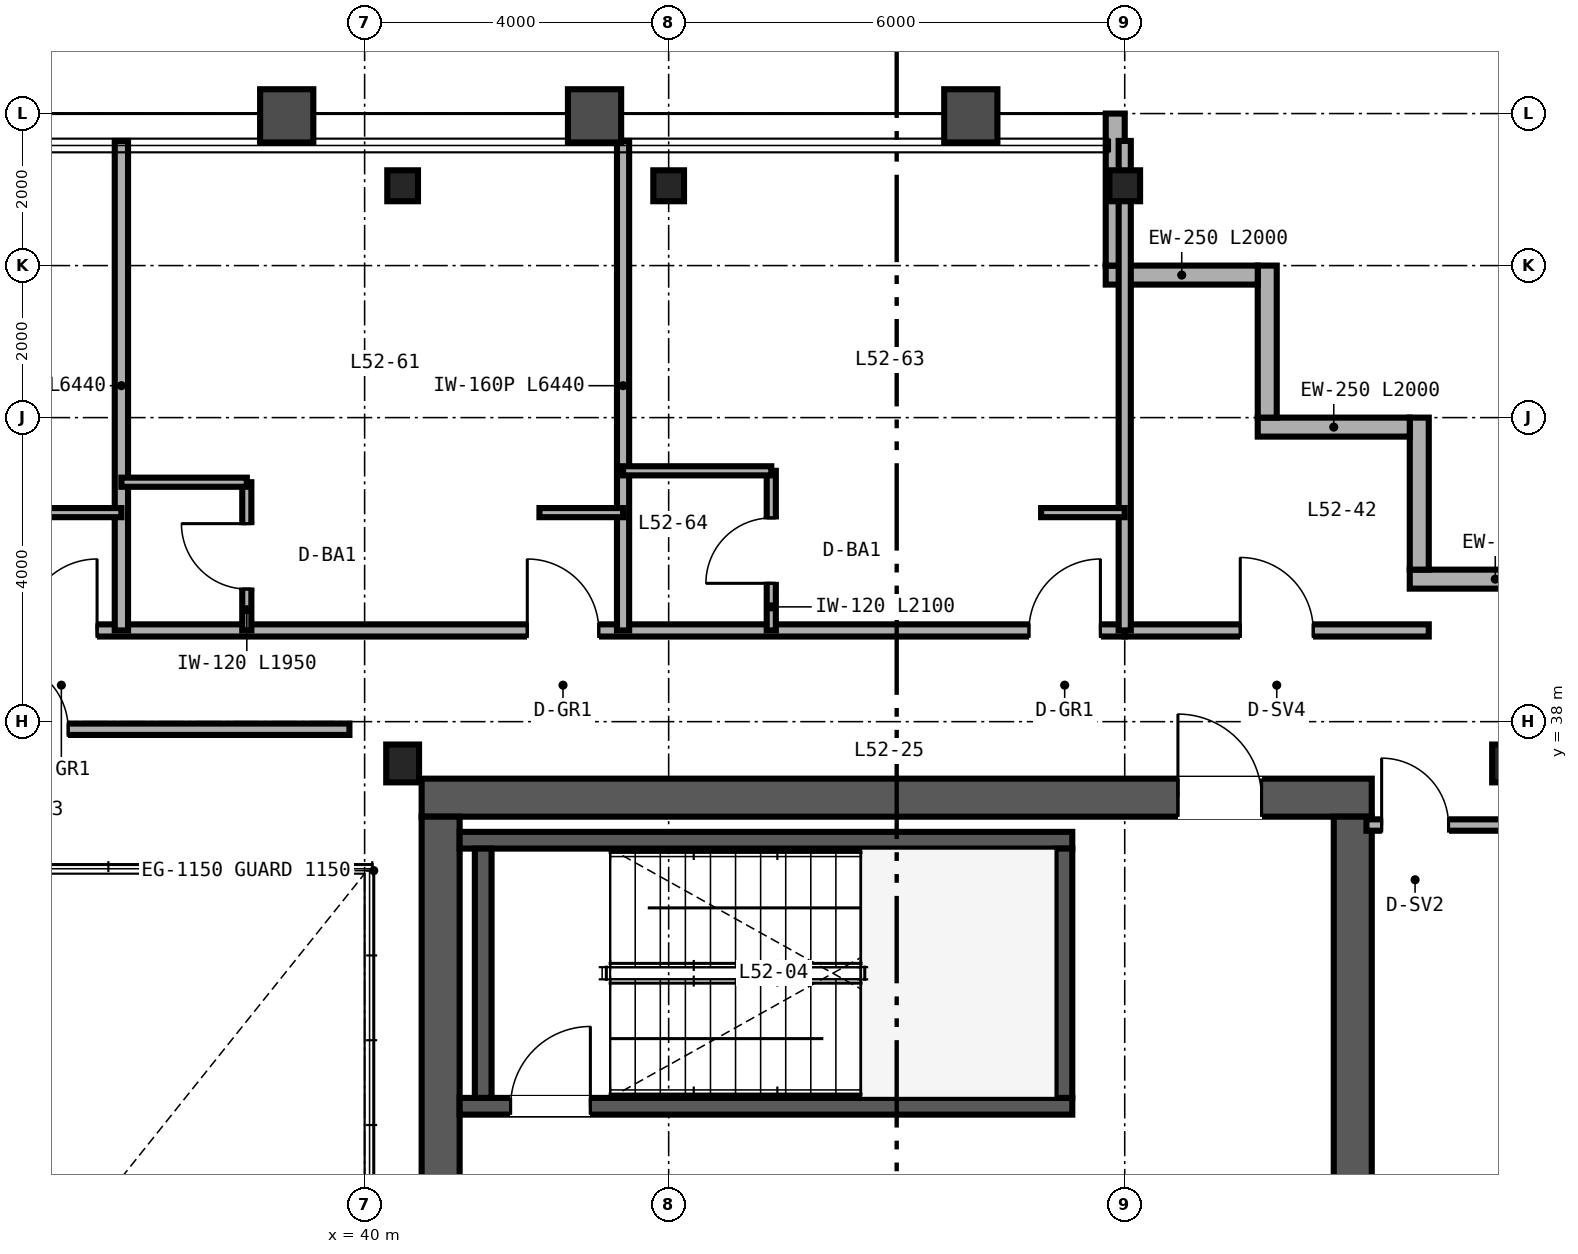
"""IFC4 building model, lengths in metres.
Left out: names, types, materials, properties, quantities, classifications, styles, units other than length and angle.
Written with IfcOpenShell. Run it as: python <this file> out.ifc"""

import sys

from ifc_helpers import new_model, si_unit, direction, frame, frame_2d, origin, origin_2d, place, context, subcontext, project, spatial, rectangle, i_section, extrude, source, transform, mapped, element, fill, save


model = new_model("IFC4")
c1 = context("Model", 3, precision=1e-05, world=origin(), true_north=direction((0.0, 1.0)))
c2 = subcontext(c1, "Body", "Model", "MODEL_VIEW")
j1 = project(units=[si_unit("LENGTHUNIT", "METRE"), si_unit("PLANEANGLEUNIT", "RADIAN")], contexts=[c1])
p1 = place(None, origin())
s1 = spatial("IfcSite", under=j1, at=p1, CompositionType="ELEMENT")
p2 = place(p1, origin())
s2 = spatial("IfcBuilding", under=s1, at=p2, CompositionType="ELEMENT")
p3 = place(p2, frame((0.0, 0.0, 206.4)))
s3 = spatial("IfcBuildingStorey", under=s2, at=p3, CompositionType="ELEMENT", Elevation=206.4)
p4 = place(p3, frame((40.75, 37.0, 0.0), z_axis=(0.0, 0.0, 1.0), x_axis=(1.0, 0.0, 0.0)))
e1 = element("IfcWall", 1, at=p4, inside=s3, PredefinedType="SHEAR", context=c2, shape_type="SweptSolid", body=[
    extrude(rectangle(XDim=12.5, YDim=0.5, at=frame_2d((6.25, 0.0))), origin(), (0.0, 0.0, 1.0), 3.37),
])
p5 = place(p4, frame((9.95, 0.0, 0.0)))
e2 = element("IfcOpeningElement", 2, at=p5, cuts=e1, PredefinedType="OPENING", context=c2, shape_type="SweptSolid", body=[
    extrude(rectangle(XDim=1.1, YDim=2.15, at=frame_2d((0.55, 1.075))), frame((0.0, 0.26, 0.0), z_axis=(0.0, -1.0, 0.0), x_axis=(1.0, 0.0, 0.0)), (0.0, 0.0, 1.0), 0.52),
])
for number, where, z_axis, x_axis in (
    (3, (41.0, 15.25, 0.0), (0.0, 0.0, 1.0), (0.0, 1.0, 0.0)),
    (4, (53.0, 15.25, 0.0), (0.0, 0.0, 1.0), (0.0, 1.0, 0.0)),
):
    element("IfcWall", number, at=place(p3, frame(where, z_axis=z_axis, x_axis=x_axis)), inside=s3, PredefinedType="SHEAR", context=c2, shape_type="SweptSolid", body=[
        extrude(rectangle(XDim=21.5, YDim=0.5, at=frame_2d((10.75, 0.0))), origin(), (0.0, 0.0, 1.0), 3.37),
    ])
p6 = place(p3, frame((41.25, 32.94, 0.0), z_axis=(0.0, 0.0, 1.0), x_axis=(1.0, 0.0, 0.0)))
e5 = element("IfcWall", 5, at=p6, inside=s3, PredefinedType="SHEAR", context=c2, shape_type="SweptSolid", body=[
    extrude(rectangle(XDim=8.06, YDim=0.22, at=frame_2d((4.03, 0.0))), origin(), (0.0, 0.0, 1.0), 3.4),
])
p7 = place(p6, frame((0.67, 0.0, 0.0)))
e6 = element("IfcOpeningElement", 6, at=p7, cuts=e5, PredefinedType="OPENING", context=c2, shape_type="SweptSolid", body=[
    extrude(rectangle(XDim=1.05, YDim=2.15, at=frame_2d((0.525, 1.075))), frame((0.0, 0.12, 0.0), z_axis=(0.0, -1.0, 0.0), x_axis=(1.0, 0.0, 0.0)), (0.0, 0.0, 1.0), 0.24),
])
p8 = place(p3, frame((41.25, 36.44, 0.0), z_axis=(0.0, 0.0, 1.0), x_axis=(1.0, 0.0, 0.0)))
e7 = element("IfcWall", 7, at=p8, inside=s3, PredefinedType="SHEAR", context=c2, shape_type="SweptSolid", body=[
    extrude(rectangle(XDim=8.06, YDim=0.22, at=frame_2d((4.03, 0.0))), origin(), (0.0, 0.0, 1.0), 3.4),
])
for number, where, z_axis, x_axis in (
    (8, (41.56, 33.05, 0.0), (0.0, 0.0, 1.0), (0.0, 1.0, 0.0)),
    (9, (49.2, 33.05, 0.0), (0.0, 0.0, 1.0), (0.0, 1.0, 0.0)),
):
    element("IfcWall", number, at=place(p3, frame(where, z_axis=z_axis, x_axis=x_axis)), inside=s3, PredefinedType="SHEAR", context=c2, shape_type="SweptSolid", body=[
        extrude(rectangle(XDim=3.28, YDim=0.22, at=frame_2d((1.64, 0.0))), origin(), (0.0, 0.0, 1.0), 3.4),
    ])
m1 = source(origin(), c2, "Body", "SweptSolid", [
    extrude(i_section(OverallWidth=0.432, OverallDepth=0.498, WebThickness=0.056, FlangeThickness=0.089, FilletRadius=0.025, at=origin_2d()), origin(), (0.0, 0.0, 1.0), 3.37),
])
for number, where, z_axis, x_axis in (
    (10, (40.5, 37.45, 0.0), (0.0, 0.0, 1.0), (1.0, 0.0, 0.0)),
    (11, (55.05, 37.45, 0.0), (0.0, 0.0, 1.0), (1.0, 0.0, 0.0)),
):
    element("IfcColumn", number, at=place(p3, frame(where, z_axis=z_axis, x_axis=x_axis)), inside=s3, PredefinedType="COLUMN", context=c2, shape_type="MappedRepresentation", body=[
        mapped(m1, transform((0.0, 0.0, 0.0), scale=1.0)),
    ])
m2 = source(origin(), c2, "Body", "SweptSolid", [
    extrude(i_section(OverallWidth=0.404, OverallDepth=0.407, WebThickness=0.027, FlangeThickness=0.044, FilletRadius=0.025, at=origin_2d()), origin(), (0.0, 0.0, 1.0), 3.37),
])
for number, where, z_axis, x_axis in (
    (12, (40.5, 45.05, 0.0), (0.0, 0.0, 1.0), (1.0, 0.0, 0.0)),
    (13, (44.0, 45.05, 0.0), (0.0, 0.0, 1.0), (1.0, 0.0, 0.0)),
    (14, (50.0, 45.05, 0.0), (0.0, 0.0, 1.0), (1.0, 0.0, 0.0)),
):
    element("IfcColumn", number, at=place(p3, frame(where, z_axis=z_axis, x_axis=x_axis)), inside=s3, PredefinedType="COLUMN", context=c2, shape_type="MappedRepresentation", body=[
        mapped(m2, transform((0.0, 0.0, 0.0), scale=1.0)),
    ])
p9 = place(p3, frame((56.0, 39.875, 0.0), z_axis=(0.0, 0.0, 1.0), x_axis=(-1.0, 0.0, 0.0)))
e15 = element("IfcWall", 15, at=p9, inside=s3, PredefinedType="SOLIDWALL", context=c2, shape_type="SweptSolid", body=[
    extrude(rectangle(XDim=2.25, YDim=0.25, at=frame_2d((1.125, 0.0))), origin(), (0.0, 0.0, 1.0), 3.37),
])
for number, where, z_axis, x_axis in (
    (16, (53.875, 40.0, 0.0), (0.0, 0.0, 1.0), (0.0, 1.0, 0.0)),
    (17, (53.75, 41.875, 0.0), (0.0, 0.0, 1.0), (-1.0, 0.0, 0.0)),
    (18, (51.875, 42.0, 0.0), (0.0, 0.0, 1.0), (0.0, 1.0, 0.0)),
    (19, (51.75, 43.875, 0.0), (0.0, 0.0, 1.0), (-1.0, 0.0, 0.0)),
):
    element("IfcWall", number, at=place(p3, frame(where, z_axis=z_axis, x_axis=x_axis)), inside=s3, PredefinedType="SOLIDWALL", context=c2, shape_type="SweptSolid", body=[
        extrude(rectangle(XDim=2.0, YDim=0.25, at=frame_2d((1.0, 0.0))), origin(), (0.0, 0.0, 1.0), 3.37),
    ])
p10 = place(p3, frame((49.875, 44.0, 0.0), z_axis=(0.0, 0.0, 1.0), x_axis=(0.0, 1.0, 0.0)))
e20 = element("IfcWall", 20, at=p10, inside=s3, PredefinedType="SOLIDWALL", context=c2, shape_type="SweptSolid", body=[
    extrude(rectangle(XDim=2.0, YDim=0.25, at=frame_2d((1.0, 0.0))), origin(), (0.0, 0.0, 1.0), 2.677),
])
p11 = place(p3, frame((24.2, 37.9, 0.0), z_axis=(0.0, 0.0, 1.0), x_axis=(1.0, 0.0, 0.0)))
e21 = element("IfcWall", 21, at=p11, inside=s3, PredefinedType="PARTITIONING", context=c2, shape_type="SweptSolid", body=[
    extrude(rectangle(XDim=15.6, YDim=0.15, at=frame_2d((7.8, 0.0))), origin(), (0.0, 0.0, 1.0), 3.37),
])
p12 = place(p11, frame((3.0, 0.0, 0.0)))
e22 = element("IfcOpeningElement", 22, at=p12, cuts=e21, PredefinedType="OPENING", context=c2, shape_type="SweptSolid", body=[
    extrude(rectangle(XDim=0.9, YDim=2.15, at=frame_2d((0.45, 1.075))), frame((0.0, 0.085, 0.0), z_axis=(0.0, -1.0, 0.0), x_axis=(1.0, 0.0, 0.0)), (0.0, 0.0, 1.0), 0.17),
])
p13 = place(p11, frame((11.0, 0.0, 0.0)))
e23 = element("IfcOpeningElement", 23, at=p13, cuts=e21, PredefinedType="OPENING", context=c2, shape_type="SweptSolid", body=[
    extrude(rectangle(XDim=0.9, YDim=2.15, at=frame_2d((0.45, 1.075))), frame((0.0, 0.085, 0.0), z_axis=(0.0, -1.0, 0.0), x_axis=(1.0, 0.0, 0.0)), (0.0, 0.0, 1.0), 0.17),
])
p14 = place(p3, frame((53.18, 36.64, 0.0), z_axis=(0.0, 0.0, 1.0), x_axis=(1.0, 0.0, 0.0)))
e24 = element("IfcWall", 24, at=p14, inside=s3, PredefinedType="PARTITIONING", context=c2, shape_type="SweptSolid", body=[
    extrude(rectangle(XDim=2.66, YDim=0.15, at=frame_2d((1.33, 0.0))), origin(), (0.0, 0.0, 1.0), 2.753),
])
p15 = place(p14, frame((0.2, 0.0, 0.0)))
e25 = element("IfcOpeningElement", 25, at=p15, cuts=e24, PredefinedType="OPENING", context=c2, shape_type="SweptSolid", body=[
    extrude(rectangle(XDim=0.88, YDim=2.15, at=frame_2d((0.44, 1.075))), frame((0.0, 0.085, 0.0), z_axis=(0.0, -1.0, 0.0), x_axis=(1.0, 0.0, 0.0)), (0.0, 0.0, 1.0), 0.17),
])
p16 = place(p3, frame((50.0, 39.2, 0.0), z_axis=(0.0, 0.0, 1.0), x_axis=(1.0, 0.0, 0.0)))
e26 = element("IfcWall", 26, at=p16, inside=s3, PredefinedType="PARTITIONING", context=c2, shape_type="SweptSolid", body=[
    extrude(rectangle(XDim=4.0, YDim=0.16, at=frame_2d((2.0, 0.0))), origin(), (0.0, 0.0, 1.0), 3.37),
])
p17 = place(p16, frame((1.52, 0.0, 0.0)))
e27 = element("IfcOpeningElement", 27, at=p17, cuts=e26, PredefinedType="OPENING", context=c2, shape_type="SweptSolid", body=[
    extrude(rectangle(XDim=0.96, YDim=2.15, at=frame_2d((0.48, 1.075))), frame((0.0, 0.09, 0.0), z_axis=(0.0, -1.0, 0.0), x_axis=(1.0, 0.0, 0.0)), (0.0, 0.0, 1.0), 0.18),
])
p18 = place(p3, frame((14.0, 39.2, 0.0), z_axis=(0.0, 0.0, 1.0), x_axis=(1.0, 0.0, 0.0)))
e28 = element("IfcWall", 28, at=p18, inside=s3, PredefinedType="PARTITIONING", context=c2, shape_type="SweptSolid", body=[
    extrude(rectangle(XDim=36.0, YDim=0.16, at=frame_2d((18.0, 0.0))), origin(), (0.0, 0.0, 1.0), 2.913),
])
p19 = place(p18, frame((4.14, 0.0, 0.0)))
e29 = element("IfcOpeningElement", 29, at=p19, cuts=e28, PredefinedType="OPENING", context=c2, shape_type="SweptSolid", body=[
    extrude(rectangle(XDim=0.94, YDim=2.15, at=frame_2d((0.47, 1.075))), frame((0.0, 0.09, 0.0), z_axis=(0.0, -1.0, 0.0), x_axis=(1.0, 0.0, 0.0)), (0.0, 0.0, 1.0), 0.18),
])
p20 = place(p18, frame((9.54, 0.0, 0.0)))
e30 = element("IfcOpeningElement", 30, at=p20, cuts=e28, PredefinedType="OPENING", context=c2, shape_type="SweptSolid", body=[
    extrude(rectangle(XDim=0.94, YDim=2.15, at=frame_2d((0.47, 1.075))), frame((0.0, 0.09, 0.0), z_axis=(0.0, -1.0, 0.0), x_axis=(1.0, 0.0, 0.0)), (0.0, 0.0, 1.0), 0.18),
])
p21 = place(p18, frame((13.32, 0.0, 0.0)))
e31 = element("IfcOpeningElement", 31, at=p21, cuts=e28, PredefinedType="OPENING", context=c2, shape_type="SweptSolid", body=[
    extrude(rectangle(XDim=0.96, YDim=2.15, at=frame_2d((0.48, 1.075))), frame((0.0, 0.09, 0.0), z_axis=(0.0, -1.0, 0.0), x_axis=(1.0, 0.0, 0.0)), (0.0, 0.0, 1.0), 0.18),
])
p22 = place(p18, frame((21.54, 0.0, 0.0)))
e32 = element("IfcOpeningElement", 32, at=p22, cuts=e28, PredefinedType="OPENING", context=c2, shape_type="SweptSolid", body=[
    extrude(rectangle(XDim=0.94, YDim=2.15, at=frame_2d((0.47, 1.075))), frame((0.0, 0.09, 0.0), z_axis=(0.0, -1.0, 0.0), x_axis=(1.0, 0.0, 0.0)), (0.0, 0.0, 1.0), 0.18),
])
p23 = place(p18, frame((28.14, 0.0, 0.0)))
e33 = element("IfcOpeningElement", 33, at=p23, cuts=e28, PredefinedType="OPENING", context=c2, shape_type="SweptSolid", body=[
    extrude(rectangle(XDim=0.94, YDim=2.15, at=frame_2d((0.47, 1.075))), frame((0.0, 0.09, 0.0), z_axis=(0.0, -1.0, 0.0), x_axis=(1.0, 0.0, 0.0)), (0.0, 0.0, 1.0), 0.18),
])
p24 = place(p18, frame((34.74, 0.0, 0.0)))
e34 = element("IfcOpeningElement", 34, at=p24, cuts=e28, PredefinedType="OPENING", context=c2, shape_type="SweptSolid", body=[
    extrude(rectangle(XDim=0.94, YDim=2.15, at=frame_2d((0.47, 1.075))), frame((0.0, 0.09, 0.0), z_axis=(0.0, -1.0, 0.0), x_axis=(1.0, 0.0, 0.0)), (0.0, 0.0, 1.0), 0.18),
])
p25 = place(p3, frame((50.0, 39.2, 0.0), z_axis=(0.0, 0.0, 1.0), x_axis=(0.0, 1.0, 0.0)))
e35 = element("IfcWall", 35, at=p25, inside=s3, PredefinedType="PARTITIONING", context=c2, shape_type="SweptSolid", body=[
    extrude(rectangle(XDim=6.44, YDim=0.16, at=frame_2d((3.22, 0.0))), origin(), (0.0, 0.0, 1.0), 2.677),
])
p26 = place(p3, frame((36.8, 39.2, 0.0), z_axis=(0.0, 0.0, 1.0), x_axis=(0.0, 1.0, 0.0)))
e36 = element("IfcWall", 36, at=p26, inside=s3, PredefinedType="PARTITIONING", context=c2, shape_type="SweptSolid", body=[
    extrude(rectangle(XDim=6.44, YDim=0.175, at=frame_2d((3.22, 0.0))), origin(), (0.0, 0.0, 1.0), 2.443),
])
p27 = place(p3, frame((35.7, 40.75, 0.0), z_axis=(0.0, 0.0, 1.0), x_axis=(1.0, 0.0, 0.0)))
e37 = element("IfcWall", 37, at=p27, inside=s3, PredefinedType="PARTITIONING", context=c2, shape_type="SweptSolid", body=[
    extrude(rectangle(XDim=1.1, YDim=0.12, at=frame_2d((0.55, 0.0))), origin(), (0.0, 0.0, 1.0), 3.37),
])
p28 = place(p3, frame((43.4, 39.2, 0.0), z_axis=(0.0, 0.0, 1.0), x_axis=(0.0, 1.0, 0.0)))
e38 = element("IfcWall", 38, at=p28, inside=s3, PredefinedType="PARTITIONING", context=c2, shape_type="SweptSolid", body=[
    extrude(rectangle(XDim=6.44, YDim=0.16, at=frame_2d((3.22, 0.0))), origin(), (0.0, 0.0, 1.0), 2.833),
])
p29 = place(p3, frame((38.45, 39.2, 0.0), z_axis=(0.0, 0.0, 1.0), x_axis=(0.0, 1.0, 0.0)))
e39 = element("IfcWall", 39, at=p29, inside=s3, PredefinedType="PARTITIONING", context=c2, shape_type="SweptSolid", body=[
    extrude(rectangle(XDim=1.95, YDim=0.12, at=frame_2d((0.975, 0.0))), origin(), (0.0, 0.0, 1.0), 3.37),
])
p30 = place(p29, frame((0.545, 0.0, 0.0)))
e40 = element("IfcOpeningElement", 40, at=p30, cuts=e39, PredefinedType="OPENING", context=c2, shape_type="SweptSolid", body=[
    extrude(rectangle(XDim=0.86, YDim=2.1, at=frame_2d((0.43, 1.05))), frame((0.0, 0.07, 0.0), z_axis=(0.0, -1.0, 0.0), x_axis=(1.0, 0.0, 0.0)), (0.0, 0.0, 1.0), 0.14),
])
p31 = place(p3, frame((36.8, 41.15, 0.0), z_axis=(0.0, 0.0, 1.0), x_axis=(1.0, 0.0, 0.0)))
e41 = element("IfcWall", 41, at=p31, inside=s3, PredefinedType="PARTITIONING", context=c2, shape_type="SweptSolid", body=[
    extrude(rectangle(XDim=1.65, YDim=0.12, at=frame_2d((0.825, 0.0))), origin(), (0.0, 0.0, 1.0), 3.37),
])
p32 = place(p3, frame((42.3, 40.75, 0.0), z_axis=(0.0, 0.0, 1.0), x_axis=(1.0, 0.0, 0.0)))
e42 = element("IfcWall", 42, at=p32, inside=s3, PredefinedType="PARTITIONING", context=c2, shape_type="SweptSolid", body=[
    extrude(rectangle(XDim=1.1, YDim=0.12, at=frame_2d((0.55, 0.0))), origin(), (0.0, 0.0, 1.0), 3.37),
])
p33 = place(p3, frame((45.35, 39.2, 0.0), z_axis=(0.0, 0.0, 1.0), x_axis=(0.0, 1.0, 0.0)))
e43 = element("IfcWall", 43, at=p33, inside=s3, PredefinedType="PARTITIONING", context=c2, shape_type="SweptSolid", body=[
    extrude(rectangle(XDim=2.1, YDim=0.12, at=frame_2d((1.05, 0.0))), origin(), (0.0, 0.0, 1.0), 3.37),
])
p34 = place(p33, frame((0.62, 0.0, 0.0)))
e44 = element("IfcOpeningElement", 44, at=p34, cuts=e43, PredefinedType="OPENING", context=c2, shape_type="SweptSolid", body=[
    extrude(rectangle(XDim=0.86, YDim=2.1, at=frame_2d((0.43, 1.05))), frame((0.0, 0.07, 0.0), z_axis=(0.0, -1.0, 0.0), x_axis=(1.0, 0.0, 0.0)), (0.0, 0.0, 1.0), 0.14),
])
p35 = place(p3, frame((43.4, 41.3, 0.0), z_axis=(0.0, 0.0, 1.0), x_axis=(1.0, 0.0, 0.0)))
e45 = element("IfcWall", 45, at=p35, inside=s3, PredefinedType="PARTITIONING", context=c2, shape_type="SweptSolid", body=[
    extrude(rectangle(XDim=1.95, YDim=0.12, at=frame_2d((0.975, 0.0))), origin(), (0.0, 0.0, 1.0), 3.37),
])
p36 = place(p3, frame((48.9, 40.75, 0.0), z_axis=(0.0, 0.0, 1.0), x_axis=(1.0, 0.0, 0.0)))
e46 = element("IfcWall", 46, at=p36, inside=s3, PredefinedType="PARTITIONING", context=c2, shape_type="SweptSolid", body=[
    extrude(rectangle(XDim=1.1, YDim=0.12, at=frame_2d((0.55, 0.0))), origin(), (0.0, 0.0, 1.0), 3.37),
])
m3 = source(origin(), c2, "Body", "SweptSolid", [
    extrude(rectangle(XDim=1.05, YDim=2.15, at=frame_2d((0.525, 1.075))), frame((0.0, 0.025, 0.0), z_axis=(0.0, -1.0, 0.0), x_axis=(1.0, 0.0, 0.0)), (0.0, 0.0, 1.0), 0.05),
])
p37 = place(p7, origin())
e47 = element("IfcDoor", 47, at=p37, inside=s3, OperationType="SINGLE_SWING_RIGHT", PredefinedType="DOOR", context=c2, shape_type="MappedRepresentation", body=[
    mapped(m3, transform((0.0, 0.0, 0.0), scale=1.0)),
])
fill(e6, e47)
m4 = source(origin(), c2, "Body", "SweptSolid", [
    extrude(rectangle(XDim=1.1, YDim=2.15, at=frame_2d((0.55, 1.075))), frame((0.0, 0.025, 0.0), z_axis=(0.0, -1.0, 0.0), x_axis=(1.0, 0.0, 0.0)), (0.0, 0.0, 1.0), 0.05),
])
p38 = place(p5, origin())
e48 = element("IfcDoor", 48, at=p38, inside=s3, OperationType="SINGLE_SWING_LEFT", PredefinedType="DOOR", context=c2, shape_type="MappedRepresentation", body=[
    mapped(m4, transform((0.0, 0.0, 0.0), scale=1.0)),
])
fill(e2, e48)
m5 = source(origin(), c2, "Body", "SweptSolid", [
    extrude(rectangle(XDim=0.9, YDim=2.15, at=frame_2d((0.45, 1.075))), frame((0.0, 0.025, 0.0), z_axis=(0.0, -1.0, 0.0), x_axis=(1.0, 0.0, 0.0)), (0.0, 0.0, 1.0), 0.05),
])
p39 = place(p13, origin())
e49 = element("IfcDoor", 49, at=p39, inside=s3, OperationType="SINGLE_SWING_LEFT", PredefinedType="DOOR", context=c2, shape_type="MappedRepresentation", body=[
    mapped(m5, transform((0.0, 0.0, 0.0), scale=1.0)),
])
fill(e23, e49)
m6 = source(origin(), c2, "Body", "SweptSolid", [
    extrude(rectangle(XDim=0.88, YDim=2.15, at=frame_2d((0.44, 1.075))), frame((0.0, 0.025, 0.0), z_axis=(0.0, -1.0, 0.0), x_axis=(1.0, 0.0, 0.0)), (0.0, 0.0, 1.0), 0.05),
])
p40 = place(p15, origin())
e50 = element("IfcDoor", 50, at=p40, inside=s3, OperationType="SINGLE_SWING_LEFT", PredefinedType="DOOR", context=c2, shape_type="MappedRepresentation", body=[
    mapped(m6, transform((0.0, 0.0, 0.0), scale=1.0)),
])
fill(e25, e50)
m7 = source(origin(), c2, "Body", "SweptSolid", [
    extrude(rectangle(XDim=0.96, YDim=2.15, at=frame_2d((0.48, 1.075))), frame((0.0, 0.025, 0.0), z_axis=(0.0, -1.0, 0.0), x_axis=(1.0, 0.0, 0.0)), (0.0, 0.0, 1.0), 0.05),
])
p41 = place(p17, origin())
e51 = element("IfcDoor", 51, at=p41, inside=s3, OperationType="SINGLE_SWING_LEFT", PredefinedType="DOOR", context=c2, shape_type="MappedRepresentation", body=[
    mapped(m7, transform((0.0, 0.0, 0.0), scale=1.0)),
])
fill(e27, e51)
m8 = source(origin(), c2, "Body", "SweptSolid", [
    extrude(rectangle(XDim=0.86, YDim=2.1, at=frame_2d((0.43, 1.05))), frame((0.0, 0.025, 0.0), z_axis=(0.0, -1.0, 0.0), x_axis=(1.0, 0.0, 0.0)), (0.0, 0.0, 1.0), 0.05),
])
p42 = place(p30, origin())
e52 = element("IfcDoor", 52, at=p42, inside=s3, OperationType="SINGLE_SWING_RIGHT", PredefinedType="DOOR", context=c2, shape_type="MappedRepresentation", body=[
    mapped(m8, transform((0.0, 0.0, 0.0), scale=1.0)),
])
fill(e40, e52)
p43 = place(p34, origin())
e53 = element("IfcDoor", 53, at=p43, inside=s3, OperationType="SINGLE_SWING_LEFT", PredefinedType="DOOR", context=c2, shape_type="MappedRepresentation", body=[
    mapped(m8, transform((0.0, 0.0, 0.0), scale=1.0)),
])
fill(e44, e53)
m9 = source(origin(), c2, "Body", "SweptSolid", [
    extrude(rectangle(XDim=0.94, YDim=2.15, at=frame_2d((0.47, 1.075))), frame((0.0, 0.025, 0.0), z_axis=(0.0, -1.0, 0.0), x_axis=(1.0, 0.0, 0.0)), (0.0, 0.0, 1.0), 0.05),
])
p44 = place(p22, origin())
e54 = element("IfcDoor", 54, at=p44, inside=s3, OperationType="SINGLE_SWING_RIGHT", PredefinedType="DOOR", context=c2, shape_type="MappedRepresentation", body=[
    mapped(m9, transform((0.0, 0.0, 0.0), scale=1.0)),
])
fill(e32, e54)
p45 = place(p23, origin())
e55 = element("IfcDoor", 55, at=p45, inside=s3, OperationType="SINGLE_SWING_LEFT", PredefinedType="DOOR", context=c2, shape_type="MappedRepresentation", body=[
    mapped(m9, transform((0.0, 0.0, 0.0), scale=1.0)),
])
fill(e33, e55)
p46 = place(p24, origin())
e56 = element("IfcDoor", 56, at=p46, inside=s3, OperationType="SINGLE_SWING_RIGHT", PredefinedType="DOOR", context=c2, shape_type="MappedRepresentation", body=[
    mapped(m9, transform((0.0, 0.0, 0.0), scale=1.0)),
])
fill(e34, e56)
save(model, sys.argv[1])
